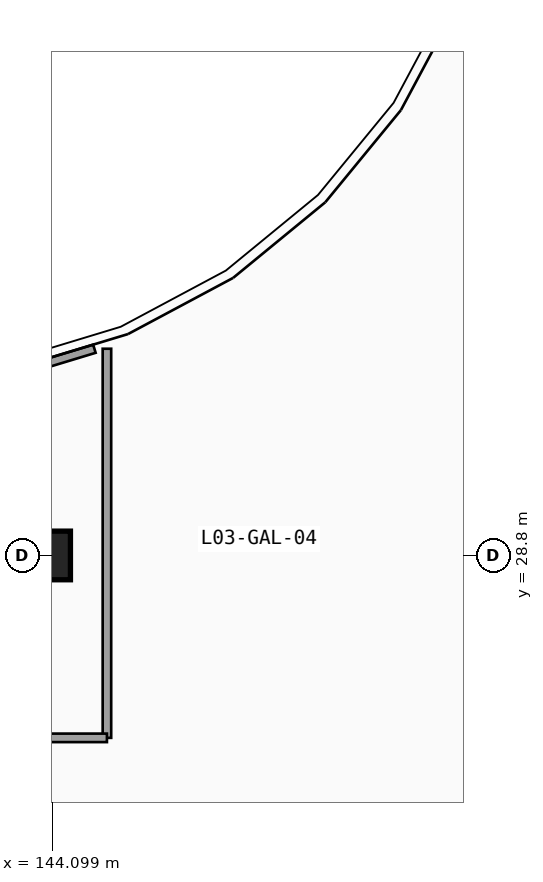
"""IFC4 building model, lengths in metres.
Left out: names, types, materials, properties, quantities, classifications, styles, units other than length and angle.
Written with IfcOpenShell. Run it as: python <this file> out.ifc"""

import sys

from ifc_helpers import new_model, si_unit, direction, frame, frame_2d, origin, origin_2d, place, context, subcontext, project, spatial, rectangle, extrude, element, save


model = new_model("IFC4")
c1 = context("Model", 3, precision=1e-05, world=origin(), true_north=direction((0.0, 1.0)))
c2 = subcontext(c1, "Body", "Model", "MODEL_VIEW")
j1 = project(units=[si_unit("LENGTHUNIT", "METRE"), si_unit("PLANEANGLEUNIT", "RADIAN")], contexts=[c1])
p1 = place(None, origin())
s1 = spatial("IfcSite", under=j1, at=p1, CompositionType="ELEMENT")
p2 = place(p1, origin())
s2 = spatial("IfcBuilding", under=s1, at=p2, CompositionType="ELEMENT")
p3 = place(p2, frame((0.0, 0.0, 14.1)))
s3 = spatial("IfcBuildingStorey", under=s2, at=p3, CompositionType="ELEMENT", Elevation=14.1)
p4 = place(p3, frame((144.0, 28.8, 0.0), z_axis=(0.0, 0.0, 1.0), x_axis=(1.0, 0.0, 0.0)))
e1 = element("IfcColumn", 1, at=p4, inside=s3, PredefinedType="COLUMN", context=c2, shape_type="SweptSolid", body=[
    extrude(rectangle(XDim=0.8, YDim=0.8, at=origin_2d()), origin(), (0.0, 0.0, 1.0), 4.5),
])
p5 = place(p3, frame((143.415, 31.781, 0.0), z_axis=(0.0, 0.0, 1.0), x_axis=(0.956921766266, 0.290345885534, 0.0)))
e2 = element("IfcWall", 2, at=p5, inside=s3, PredefinedType="PARTITIONING", context=c2, shape_type="SweptSolid", body=[
    extrude(rectangle(XDim=1.441, YDim=0.14, at=frame_2d((0.721, 0.0))), origin(), (0.0, 0.0, 1.0), 4.24),
])
p6 = place(p3, frame((145.0, 32.2, 0.0), z_axis=(0.0, 0.0, 1.0), x_axis=(0.0, -1.0, 0.0)))
e3 = element("IfcWall", 3, at=p6, inside=s3, PredefinedType="PARTITIONING", context=c2, shape_type="SweptSolid", body=[
    extrude(rectangle(XDim=6.4, YDim=0.14, at=frame_2d((3.2, 0.0))), origin(), (0.0, 0.0, 1.0), 3.556),
])
p7 = place(p3, frame((145.0, 25.8, 0.0), z_axis=(0.0, 0.0, 1.0), x_axis=(-1.0, 0.0, 0.0)))
e4 = element("IfcWall", 4, at=p7, inside=s3, PredefinedType="PARTITIONING", context=c2, shape_type="SweptSolid", body=[
    extrude(rectangle(XDim=4.62, YDim=0.14, at=frame_2d((2.31, 0.0))), origin(), (0.0, 0.0, 1.0), 3.638),
])
save(model, sys.argv[1])
